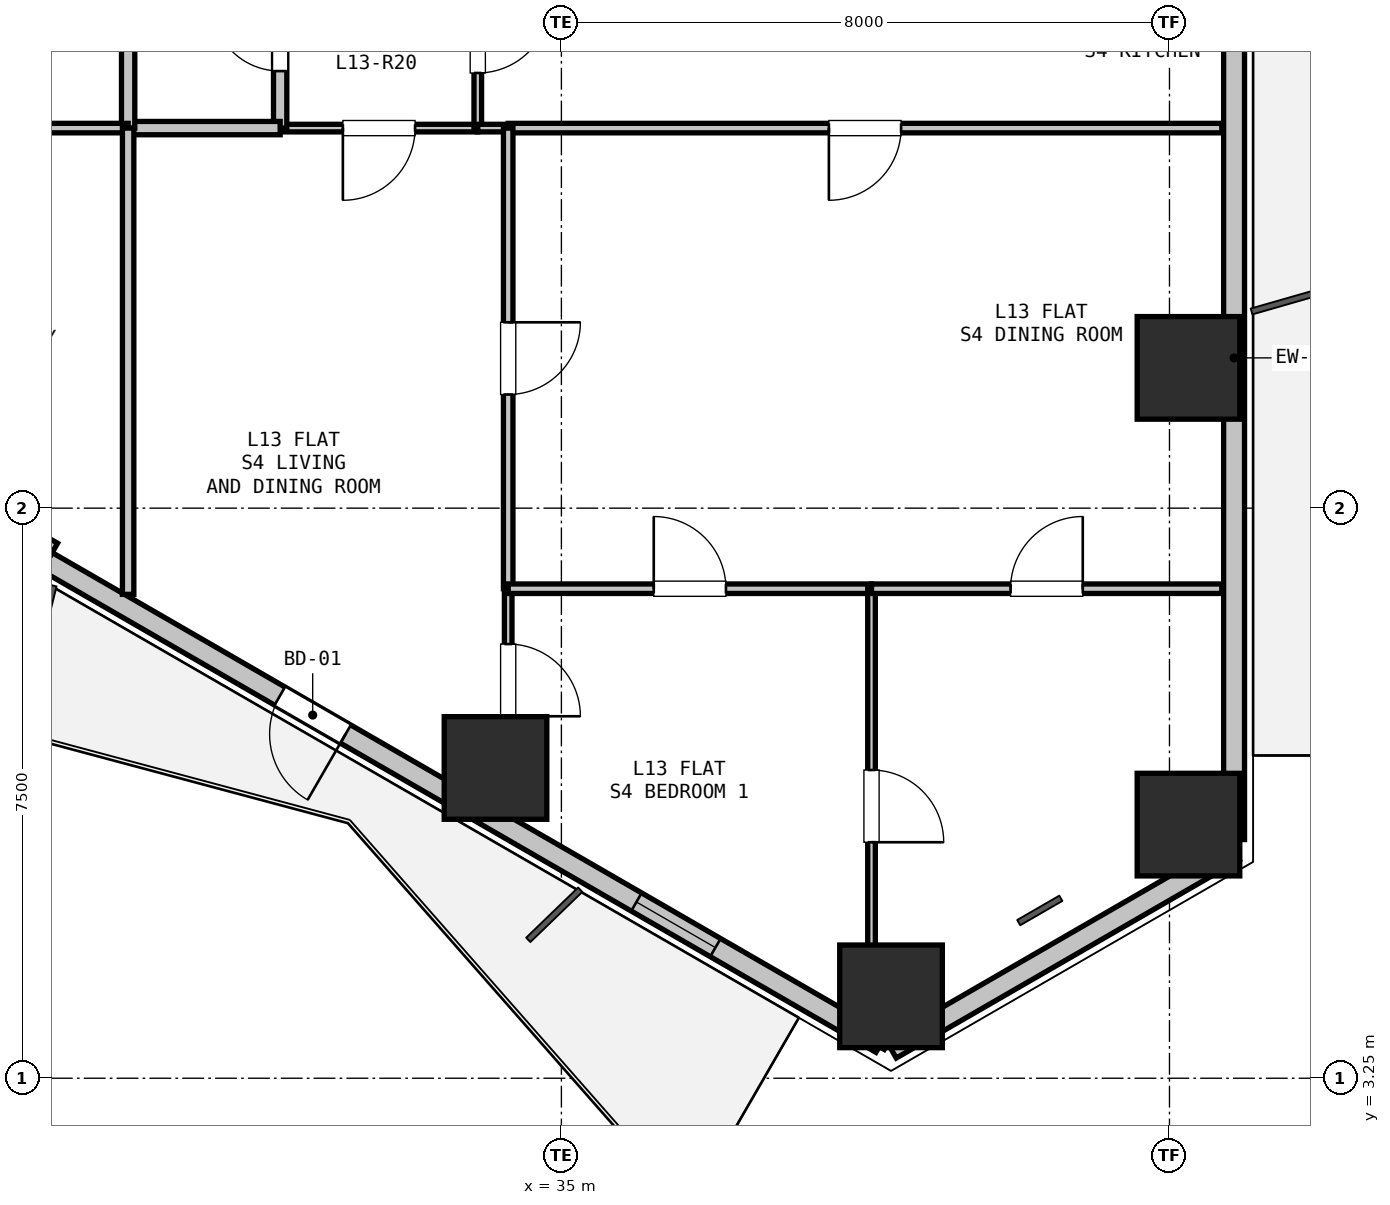
"""IFC4 building model, lengths in metres.
Left out: names, types, materials, properties, quantities, classifications, styles, units other than length and angle.
Written with IfcOpenShell. Run it as: python <this file> out.ifc"""

import sys

from ifc_helpers import new_model, si_unit, direction, frame, frame_2d, origin, origin_2d, place, context, subcontext, project, spatial, rectangle, hollow_rectangle, extrude, element, fill, save


model = new_model("IFC4")
c1 = context("Model", 3, precision=1e-05, world=origin(), true_north=direction((0.0, 1.0)))
c2 = subcontext(c1, "Body", "Model", "MODEL_VIEW")
j1 = project(units=[si_unit("LENGTHUNIT", "METRE"), si_unit("PLANEANGLEUNIT", "RADIAN")], contexts=[c1])
p1 = place(None, origin())
s1 = spatial("IfcSite", under=j1, at=p1, CompositionType="ELEMENT")
p2 = place(p1, origin())
s2 = spatial("IfcBuilding", under=s1, at=p2, CompositionType="ELEMENT")
p3 = place(p2, frame((0.0, 0.0, 48.9)))
s3 = spatial("IfcBuildingStorey", under=s2, at=p3, CompositionType="ELEMENT", Elevation=48.9)
for number, where, z_axis, x_axis in (
    (1, (43.25, 12.595, 0.0), (0.0, 0.0, 1.0), (1.0, 0.0, 0.0)),
    (2, (43.25, 6.587, 0.0), (0.0, 0.0, 1.0), (1.0, 0.0, 0.0)),
    (3, (39.337, 4.327, 0.0), (0.0, 0.0, 1.0), (1.0, 0.0, 0.0)),
    (4, (34.133, 7.332, 0.0), (0.0, 0.0, 1.0), (1.0, 0.0, 0.0)),
):
    element("IfcColumn", number, at=place(p3, frame(where, z_axis=z_axis, x_axis=x_axis)), inside=s3, PredefinedType="COLUMN", context=c2, shape_type="SweptSolid", body=[
        extrude(hollow_rectangle(XDim=1.35, YDim=1.35, WallThickness=0.036, at=origin_2d()), origin(), (0.0, 0.0, 1.0), 3.3),
    ])
p4 = place(p3, frame((43.85, 6.24, 0.0), z_axis=(0.0, 0.0, 1.0), x_axis=(-0.866043601342, -0.499968479581, 0.0)))
e5 = element("IfcWall", 5, at=p4, inside=s3, PredefinedType="SOLIDWALL", context=c2, shape_type="SweptSolid", body=[
    extrude(rectangle(XDim=5.211, YDim=0.275, at=frame_2d((2.605, 0.0))), origin(), (0.0, 0.0, 1.0), 2.66),
])
p5 = place(p3, frame((43.85, 19.063, 0.0), z_axis=(0.0, 0.0, 1.0), x_axis=(0.0, -1.0, 0.0)))
e6 = element("IfcWall", 6, at=p5, inside=s3, PredefinedType="SOLIDWALL", context=c2, shape_type="SweptSolid", body=[
    extrude(rectangle(XDim=12.673, YDim=0.275, at=frame_2d((6.336, 0.0))), origin(), (0.0, 0.0, 1.0), 2.66),
])
p6 = place(p3, frame((39.207, 3.71, 0.0), z_axis=(0.0, 0.0, 1.0), x_axis=(-0.86603192154, 0.499988710747, 0.0)))
e7 = element("IfcWall", 7, at=p6, inside=s3, PredefinedType="SOLIDWALL", context=c2, shape_type="SweptSolid", body=[
    extrude(rectangle(XDim=12.673, YDim=0.275, at=frame_2d((6.336, 0.0))), origin(), (0.0, 0.0, 1.0), 2.66),
])
p7 = place(p6, frame((8.136, 0.0, 0.0)))
e8 = element("IfcOpeningElement", 8, at=p7, cuts=e7, PredefinedType="OPENING", context=c2, shape_type="SweptSolid", body=[
    extrude(rectangle(XDim=1.0, YDim=2.1, at=frame_2d((0.5, 1.05))), frame((0.0, 0.147, 0.0), z_axis=(0.0, -1.0, 0.0), x_axis=(1.0, 0.0, 0.0)), (0.0, 0.0, 1.0), 0.295),
])
p8 = place(p6, frame((2.518, 0.0, 0.9)))
e9 = element("IfcOpeningElement", 9, at=p8, cuts=e7, PredefinedType="OPENING", context=c2, shape_type="SweptSolid", body=[
    extrude(rectangle(XDim=1.2, YDim=1.4, at=frame_2d((0.6, 0.7))), frame((0.0, 0.147, 0.0), z_axis=(0.0, -1.0, 0.0), x_axis=(1.0, 0.0, 0.0)), (0.0, 0.0, 1.0), 0.295),
])
p9 = place(p3, frame((28.322, 10.202, 0.0), z_axis=(0.0, 0.0, 1.0), x_axis=(-0.86605165483, 0.499954529098, 0.0)))
e10 = element("IfcWall", 10, at=p9, inside=s3, PredefinedType="PARAPET", context=c2, shape_type="SweptSolid", body=[
    extrude(rectangle(XDim=1.7, YDim=0.2, at=frame_2d((0.85, 0.0))), origin(), (0.0, 0.0, 1.0), 2.66),
])
p10 = place(p3, frame((33.9, 15.75, 0.0), z_axis=(0.0, 0.0, 1.0), x_axis=(-1.0, 0.0, 0.0)))
e11 = element("IfcWall", 11, at=p10, inside=s3, PredefinedType="PARTITIONING", context=c2, shape_type="SweptSolid", body=[
    extrude(rectangle(XDim=2.6, YDim=0.1, at=frame_2d((1.3, 0.0))), origin(), (0.0, 0.0, 1.0), 3.04),
])
p11 = place(p10, frame((0.825, 0.0, 0.0)))
e12 = element("IfcOpeningElement", 12, at=p11, cuts=e11, PredefinedType="OPENING", context=c2, shape_type="SweptSolid", body=[
    extrude(rectangle(XDim=0.95, YDim=2.1, at=frame_2d((0.475, 1.05))), frame((0.0, 0.06, 0.0), z_axis=(0.0, -1.0, 0.0), x_axis=(1.0, 0.0, 0.0)), (0.0, 0.0, 1.0), 0.12),
])
p12 = place(p3, frame((31.3, 15.75, 0.0), z_axis=(0.0, 0.0, 1.0), x_axis=(0.0, 1.0, 0.0)))
e13 = element("IfcWall", 13, at=p12, inside=s3, PredefinedType="PLUMBINGWALL", context=c2, shape_type="SweptSolid", body=[
    extrude(rectangle(XDim=2.4, YDim=0.175, at=frame_2d((1.2, 0.0))), origin(), (0.0, 0.0, 1.0), 3.04),
])
p13 = place(p12, frame((0.75, 0.0, 0.0)))
e14 = element("IfcOpeningElement", 14, at=p13, cuts=e13, PredefinedType="OPENING", context=c2, shape_type="SweptSolid", body=[
    extrude(rectangle(XDim=0.9, YDim=2.1, at=frame_2d((0.45, 1.05))), frame((0.0, 0.097, 0.0), z_axis=(0.0, -1.0, 0.0), x_axis=(1.0, 0.0, 0.0)), (0.0, 0.0, 1.0), 0.195),
])
p14 = place(p3, frame((33.9, 18.15, 0.0), z_axis=(0.0, 0.0, 1.0), x_axis=(0.0, -1.0, 0.0)))
e15 = element("IfcWall", 15, at=p14, inside=s3, PredefinedType="PARTITIONING", context=c2, shape_type="SweptSolid", body=[
    extrude(rectangle(XDim=2.4, YDim=0.1, at=frame_2d((1.2, 0.0))), origin(), (0.0, 0.0, 1.0), 3.04),
])
p15 = place(p14, frame((0.725, 0.0, 0.0)))
e16 = element("IfcOpeningElement", 16, at=p15, cuts=e15, PredefinedType="OPENING", context=c2, shape_type="SweptSolid", body=[
    extrude(rectangle(XDim=0.95, YDim=2.1, at=frame_2d((0.475, 1.05))), frame((0.0, 0.06, 0.0), z_axis=(0.0, -1.0, 0.0), x_axis=(1.0, 0.0, 0.0)), (0.0, 0.0, 1.0), 0.12),
])
p16 = place(p3, frame((31.3, 15.75, 0.0), z_axis=(0.0, 0.0, 1.0), x_axis=(-1.0, 0.0, 0.0)))
e17 = element("IfcWall", 17, at=p16, inside=s3, PredefinedType="PLUMBINGWALL", context=c2, shape_type="SweptSolid", body=[
    extrude(rectangle(XDim=2.0, YDim=0.175, at=frame_2d((1.0, 0.0))), origin(), (0.0, 0.0, 1.0), 3.04),
])
p17 = place(p3, frame((29.3, 15.75, 0.0), z_axis=(0.0, 0.0, 1.0), x_axis=(0.0, 1.0, 0.0)))
e18 = element("IfcWall", 18, at=p17, inside=s3, PredefinedType="PLUMBINGWALL", context=c2, shape_type="SweptSolid", body=[
    extrude(rectangle(XDim=2.4, YDim=0.175, at=frame_2d((1.2, 0.0))), origin(), (0.0, 0.0, 1.0), 3.04),
])
p18 = place(p3, frame((43.688, 15.75, 0.0), z_axis=(0.0, 0.0, 1.0), x_axis=(-1.0, 0.0, 0.0)))
e19 = element("IfcWall", 19, at=p18, inside=s3, PredefinedType="PARTITIONING", context=c2, shape_type="SweptSolid", body=[
    extrude(rectangle(XDim=9.388, YDim=0.125, at=frame_2d((4.694, 0.0))), origin(), (0.0, 0.0, 1.0), 2.338),
])
p19 = place(p18, frame((4.219, 0.0, 0.0)))
e20 = element("IfcOpeningElement", 20, at=p19, cuts=e19, PredefinedType="OPENING", context=c2, shape_type="SweptSolid", body=[
    extrude(rectangle(XDim=0.95, YDim=2.1, at=frame_2d((0.475, 1.05))), frame((0.0, 0.073, 0.0), z_axis=(0.0, -1.0, 0.0), x_axis=(1.0, 0.0, 0.0)), (0.0, 0.0, 1.0), 0.145),
])
p20 = place(p3, frame((34.3, 15.75, 0.0), z_axis=(0.0, 0.0, 1.0), x_axis=(-1.0, 0.0, 0.0)))
e21 = element("IfcWall", 21, at=p20, inside=s3, PredefinedType="PARTITIONING", context=c2, shape_type="SweptSolid", body=[
    extrude(rectangle(XDim=0.4, YDim=0.1, at=frame_2d((0.2, 0.0))), origin(), (0.0, 0.0, 1.0), 3.04),
])
p21 = place(p3, frame((27.1, 15.75, 0.0), z_axis=(0.0, 0.0, 1.0), x_axis=(1.0, 0.0, 0.0)))
e22 = element("IfcWall", 22, at=p21, inside=s3, PredefinedType="PARTITIONING", context=c2, shape_type="SweptSolid", body=[
    extrude(rectangle(XDim=2.2, YDim=0.125, at=frame_2d((1.1, 0.0))), origin(), (0.0, 0.0, 1.0), 3.04),
])
p22 = place(p3, frame((29.3, 15.75, 0.0), z_axis=(0.0, 0.0, 1.0), x_axis=(0.0, -1.0, 0.0)))
e23 = element("IfcWall", 23, at=p22, inside=s3, PredefinedType="PARTITIONING", context=c2, shape_type="SweptSolid", body=[
    extrude(rectangle(XDim=6.134, YDim=0.15, at=frame_2d((3.067, 0.0))), origin(), (0.0, 0.0, 1.0), 2.338),
])
p23 = place(p3, frame((34.3, 15.75, 0.0), z_axis=(0.0, 0.0, 1.0), x_axis=(0.0, -1.0, 0.0)))
e24 = element("IfcWall", 24, at=p23, inside=s3, PredefinedType="PARTITIONING", context=c2, shape_type="SweptSolid", body=[
    extrude(rectangle(XDim=6.06, YDim=0.125, at=frame_2d((3.03, 0.0))), origin(), (0.0, 0.0, 1.0), 3.04),
])
p24 = place(p23, frame((2.555, 0.0, 0.0)))
e25 = element("IfcOpeningElement", 25, at=p24, cuts=e24, PredefinedType="OPENING", context=c2, shape_type="SweptSolid", body=[
    extrude(rectangle(XDim=0.95, YDim=2.1, at=frame_2d((0.475, 1.05))), frame((0.0, 0.073, 0.0), z_axis=(0.0, -1.0, 0.0), x_axis=(1.0, 0.0, 0.0)), (0.0, 0.0, 1.0), 0.145),
])
p25 = place(p3, frame((34.3, 9.69, 0.0), z_axis=(0.0, 0.0, 1.0), x_axis=(0.0, -1.0, 0.0)))
e26 = element("IfcWall", 26, at=p25, inside=s3, PredefinedType="PARTITIONING", context=c2, shape_type="SweptSolid", body=[
    extrude(rectangle(XDim=2.961, YDim=0.1, at=frame_2d((1.48, 0.0))), origin(), (0.0, 0.0, 1.0), 3.04),
])
p26 = place(p25, frame((0.728, 0.0, 0.0)))
e27 = element("IfcOpeningElement", 27, at=p26, cuts=e26, PredefinedType="OPENING", context=c2, shape_type="SweptSolid", body=[
    extrude(rectangle(XDim=0.95, YDim=2.1, at=frame_2d((0.475, 1.05))), frame((0.0, 0.06, 0.0), z_axis=(0.0, -1.0, 0.0), x_axis=(1.0, 0.0, 0.0)), (0.0, 0.0, 1.0), 0.12),
])
p27 = place(p3, frame((34.3, 9.69, 0.0), z_axis=(0.0, 0.0, 1.0), x_axis=(1.0, 0.0, 0.0)))
e28 = element("IfcWall", 28, at=p27, inside=s3, PredefinedType="PARTITIONING", context=c2, shape_type="SweptSolid", body=[
    extrude(rectangle(XDim=4.78, YDim=0.125, at=frame_2d((2.39, 0.0))), origin(), (0.0, 0.0, 1.0), 3.04),
])
p28 = place(p27, frame((1.915, 0.0, 0.0)))
e29 = element("IfcOpeningElement", 29, at=p28, cuts=e28, PredefinedType="OPENING", context=c2, shape_type="SweptSolid", body=[
    extrude(rectangle(XDim=0.95, YDim=2.1, at=frame_2d((0.475, 1.05))), frame((0.0, 0.073, 0.0), z_axis=(0.0, -1.0, 0.0), x_axis=(1.0, 0.0, 0.0)), (0.0, 0.0, 1.0), 0.145),
])
p29 = place(p3, frame((39.08, 9.69, 0.0), z_axis=(0.0, 0.0, 1.0), x_axis=(0.0, -1.0, 0.0)))
e30 = element("IfcWall", 30, at=p29, inside=s3, PredefinedType="PARTITIONING", context=c2, shape_type="SweptSolid", body=[
    extrude(rectangle(XDim=5.72, YDim=0.1, at=frame_2d((2.86, 0.0))), origin(), (0.0, 0.0, 1.0), 3.04),
])
p30 = place(p29, frame((2.385, 0.0, 0.0)))
e31 = element("IfcOpeningElement", 31, at=p30, cuts=e30, PredefinedType="OPENING", context=c2, shape_type="SweptSolid", body=[
    extrude(rectangle(XDim=0.95, YDim=2.1, at=frame_2d((0.475, 1.05))), frame((0.0, 0.06, 0.0), z_axis=(0.0, -1.0, 0.0), x_axis=(1.0, 0.0, 0.0)), (0.0, 0.0, 1.0), 0.12),
])
p31 = place(p3, frame((39.08, 9.69, 0.0), z_axis=(0.0, 0.0, 1.0), x_axis=(1.0, 0.0, 0.0)))
e32 = element("IfcWall", 32, at=p31, inside=s3, PredefinedType="PARTITIONING", context=c2, shape_type="SweptSolid", body=[
    extrude(rectangle(XDim=4.608, YDim=0.125, at=frame_2d((2.304, 0.0))), origin(), (0.0, 0.0, 1.0), 2.338),
])
p32 = place(p31, frame((1.829, 0.0, 0.0)))
e33 = element("IfcOpeningElement", 33, at=p32, cuts=e32, PredefinedType="OPENING", context=c2, shape_type="SweptSolid", body=[
    extrude(rectangle(XDim=0.95, YDim=2.1, at=frame_2d((0.475, 1.05))), frame((0.0, 0.073, 0.0), z_axis=(0.0, -1.0, 0.0), x_axis=(1.0, 0.0, 0.0)), (0.0, 0.0, 1.0), 0.145),
])
p33 = place(p3, frame((39.272, 3.672, 0.0), z_axis=(0.0, 0.0, 1.0), x_axis=(-0.866442544969, 0.49927679324, 0.0)))
e34 = element("IfcWall", 34, at=p33, inside=s3, PredefinedType="PARTITIONING", context=c2, shape_type="SweptSolid", body=[
    extrude(rectangle(XDim=0.142, YDim=0.1, at=frame_2d((0.071, 0.0))), origin(), (0.0, 0.0, 1.0), 3.04),
])
p34 = place(p7, origin())
e35 = element("IfcDoor", 35, at=p34, inside=s3, OperationType="SINGLE_SWING_LEFT", PredefinedType="DOOR", context=c2, shape_type="SweptSolid", body=[
    extrude(rectangle(XDim=1.0, YDim=2.1, at=frame_2d((0.5, 1.05))), frame((0.0, 0.025, 0.0), z_axis=(0.0, -1.0, 0.0), x_axis=(1.0, 0.0, 0.0)), (0.0, 0.0, 1.0), 0.05),
])
fill(e8, e35)
p35 = place(p8, origin())
e36 = element("IfcWindow", 36, at=p35, inside=s3, PartitioningType="SINGLE_PANEL", PredefinedType="WINDOW", context=c2, shape_type="SweptSolid", body=[
    extrude(rectangle(XDim=1.2, YDim=1.4, at=frame_2d((0.6, 0.7))), frame((0.0, 0.03, 0.0), z_axis=(0.0, -1.0, 0.0), x_axis=(1.0, 0.0, 0.0)), (0.0, 0.0, 1.0), 0.06),
])
fill(e9, e36)
p36 = place(p13, origin())
e37 = element("IfcDoor", 37, at=p36, inside=s3, OperationType="SINGLE_SWING_RIGHT", PredefinedType="DOOR", context=c2, shape_type="SweptSolid", body=[
    extrude(rectangle(XDim=0.9, YDim=2.1, at=frame_2d((0.45, 1.05))), frame((0.0, 0.025, 0.0), z_axis=(0.0, -1.0, 0.0), x_axis=(1.0, 0.0, 0.0)), (0.0, 0.0, 1.0), 0.05),
])
fill(e14, e37)
p37 = place(p15, origin())
e38 = element("IfcDoor", 38, at=p37, inside=s3, OperationType="SINGLE_SWING_LEFT", PredefinedType="DOOR", context=c2, shape_type="SweptSolid", body=[
    extrude(rectangle(XDim=0.95, YDim=2.1, at=frame_2d((0.475, 1.05))), frame((0.0, 0.025, 0.0), z_axis=(0.0, -1.0, 0.0), x_axis=(1.0, 0.0, 0.0)), (0.0, 0.0, 1.0), 0.05),
])
fill(e16, e38)
p38 = place(p11, origin())
e39 = element("IfcDoor", 39, at=p38, inside=s3, OperationType="SINGLE_SWING_RIGHT", PredefinedType="DOOR", context=c2, shape_type="SweptSolid", body=[
    extrude(rectangle(XDim=0.95, YDim=2.1, at=frame_2d((0.475, 1.05))), frame((0.0, 0.025, 0.0), z_axis=(0.0, -1.0, 0.0), x_axis=(1.0, 0.0, 0.0)), (0.0, 0.0, 1.0), 0.05),
])
fill(e12, e39)
p39 = place(p19, origin())
e40 = element("IfcDoor", 40, at=p39, inside=s3, OperationType="SINGLE_SWING_RIGHT", PredefinedType="DOOR", context=c2, shape_type="SweptSolid", body=[
    extrude(rectangle(XDim=0.95, YDim=2.1, at=frame_2d((0.475, 1.05))), frame((0.0, 0.025, 0.0), z_axis=(0.0, -1.0, 0.0), x_axis=(1.0, 0.0, 0.0)), (0.0, 0.0, 1.0), 0.05),
])
fill(e20, e40)
p40 = place(p26, origin())
e41 = element("IfcDoor", 41, at=p40, inside=s3, OperationType="SINGLE_SWING_RIGHT", PredefinedType="DOOR", context=c2, shape_type="SweptSolid", body=[
    extrude(rectangle(XDim=0.95, YDim=2.1, at=frame_2d((0.475, 1.05))), frame((0.0, 0.025, 0.0), z_axis=(0.0, -1.0, 0.0), x_axis=(1.0, 0.0, 0.0)), (0.0, 0.0, 1.0), 0.05),
])
fill(e27, e41)
p41 = place(p24, origin())
e42 = element("IfcDoor", 42, at=p41, inside=s3, OperationType="SINGLE_SWING_LEFT", PredefinedType="DOOR", context=c2, shape_type="SweptSolid", body=[
    extrude(rectangle(XDim=0.95, YDim=2.1, at=frame_2d((0.475, 1.05))), frame((0.0, 0.025, 0.0), z_axis=(0.0, -1.0, 0.0), x_axis=(1.0, 0.0, 0.0)), (0.0, 0.0, 1.0), 0.05),
])
fill(e25, e42)
p42 = place(p30, origin())
e43 = element("IfcDoor", 43, at=p42, inside=s3, OperationType="SINGLE_SWING_RIGHT", PredefinedType="DOOR", context=c2, shape_type="SweptSolid", body=[
    extrude(rectangle(XDim=0.95, YDim=2.1, at=frame_2d((0.475, 1.05))), frame((0.0, 0.025, 0.0), z_axis=(0.0, -1.0, 0.0), x_axis=(1.0, 0.0, 0.0)), (0.0, 0.0, 1.0), 0.05),
])
fill(e31, e43)
p43 = place(p28, origin())
e44 = element("IfcDoor", 44, at=p43, inside=s3, OperationType="SINGLE_SWING_LEFT", PredefinedType="DOOR", context=c2, shape_type="SweptSolid", body=[
    extrude(rectangle(XDim=0.95, YDim=2.1, at=frame_2d((0.475, 1.05))), frame((0.0, 0.025, 0.0), z_axis=(0.0, -1.0, 0.0), x_axis=(1.0, 0.0, 0.0)), (0.0, 0.0, 1.0), 0.05),
])
fill(e29, e44)
p44 = place(p32, origin())
e45 = element("IfcDoor", 45, at=p44, inside=s3, OperationType="SINGLE_SWING_RIGHT", PredefinedType="DOOR", context=c2, shape_type="SweptSolid", body=[
    extrude(rectangle(XDim=0.95, YDim=2.1, at=frame_2d((0.475, 1.05))), frame((0.0, 0.025, 0.0), z_axis=(0.0, -1.0, 0.0), x_axis=(1.0, 0.0, 0.0)), (0.0, 0.0, 1.0), 0.05),
])
fill(e33, e45)
save(model, sys.argv[1])
